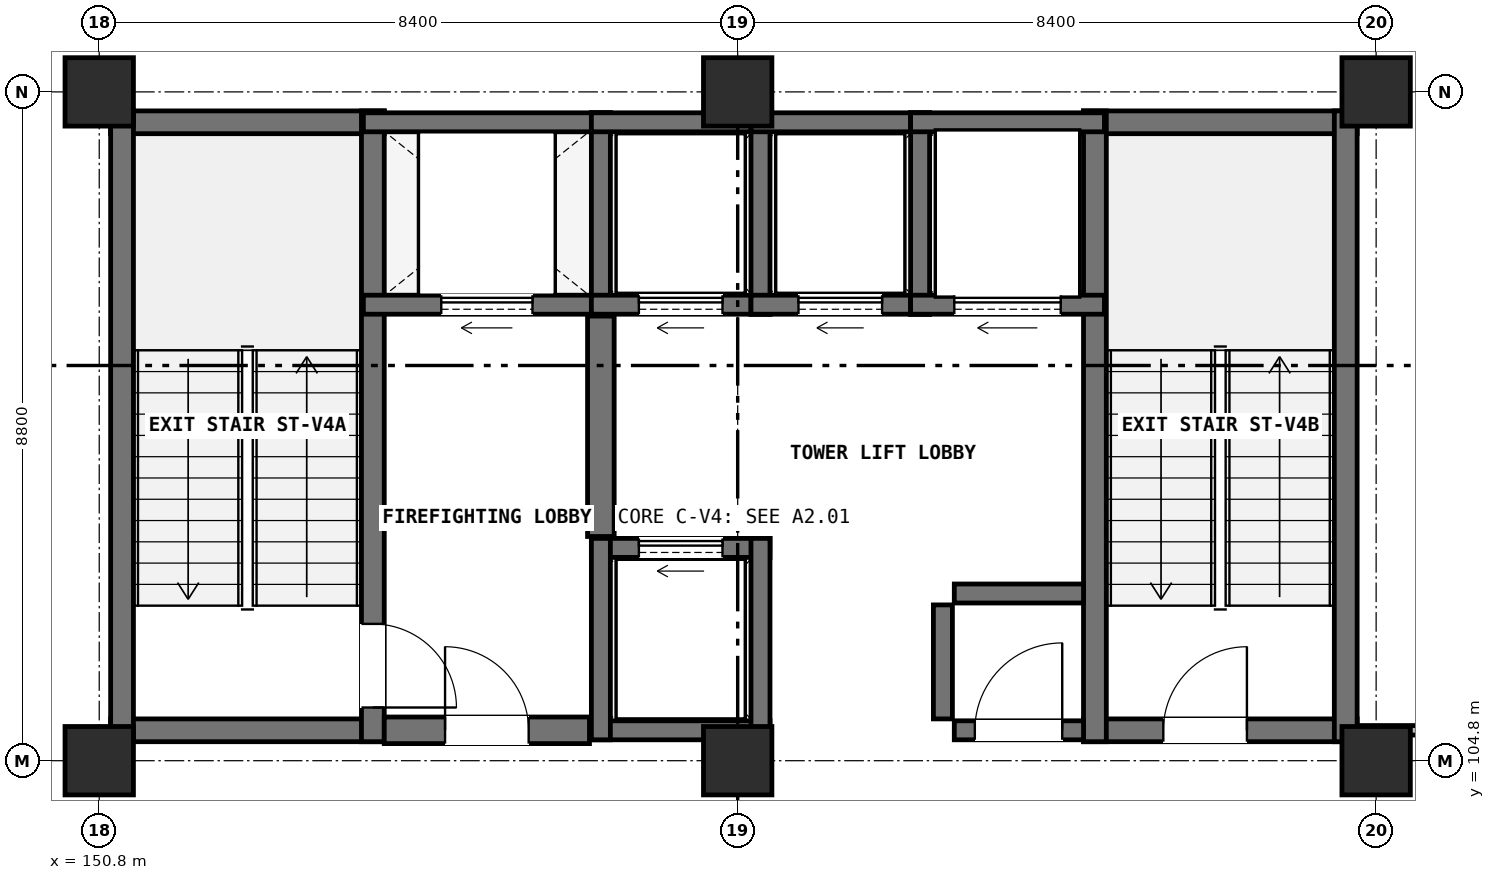
"""IFC4 building model, lengths in metres.
Left out: names, types, materials, properties, quantities, classifications, styles, units other than length and angle.
Written with IfcOpenShell. Run it as: python <this file> out.ifc"""

import sys

from ifc_helpers import new_model, si_unit, direction, frame, frame_2d, origin, origin_2d, place, context, subcontext, project, spatial, rectangle, extrude, element, fill, save


model = new_model("IFC4")
c1 = context("Model", 3, precision=1e-05, world=origin(), true_north=direction((0.0, 1.0)))
c2 = subcontext(c1, "Body", "Model", "MODEL_VIEW")
j1 = project(units=[si_unit("LENGTHUNIT", "METRE"), si_unit("PLANEANGLEUNIT", "RADIAN")], contexts=[c1])
p1 = place(None, origin())
s1 = spatial("IfcSite", under=j1, at=p1, CompositionType="ELEMENT")
p2 = place(p1, origin())
s2 = spatial("IfcBuilding", under=s1, at=p2, CompositionType="ELEMENT")
p3 = place(p2, frame((0.0, 0.0, -4.5)))
s3 = spatial("IfcBuildingStorey", under=s2, at=p3, CompositionType="ELEMENT", Elevation=-4.5)
for number, where, z_axis, x_axis in (
    (1, (150.8, 104.8, 0.0), (0.0, 0.0, 1.0), (1.0, 0.0, 0.0)),
    (2, (150.8, 113.6, 0.0), (0.0, 0.0, 1.0), (1.0, 0.0, 0.0)),
    (3, (159.2, 104.8, 0.0), (0.0, 0.0, 1.0), (1.0, 0.0, 0.0)),
    (4, (159.2, 113.6, 0.0), (0.0, 0.0, 1.0), (1.0, 0.0, 0.0)),
    (5, (167.6, 104.8, 0.0), (0.0, 0.0, 1.0), (1.0, 0.0, 0.0)),
    (6, (167.6, 113.6, 0.0), (0.0, 0.0, 1.0), (1.0, 0.0, 0.0)),
):
    element("IfcColumn", number, at=place(p3, frame(where, z_axis=z_axis, x_axis=x_axis)), inside=s3, PredefinedType="COLUMN", context=c2, shape_type="SweptSolid", body=[
        extrude(rectangle(XDim=0.9, YDim=0.9, at=origin_2d()), origin(), (0.0, 0.0, 1.0), 4.5),
    ])
for number, where, z_axis, x_axis in (
    (7, (150.95, 105.2, 0.0), (0.0, 0.0, 1.0), (1.0, 0.0, 0.0)),
    (8, (150.95, 113.2, 0.0), (0.0, 0.0, 1.0), (1.0, 0.0, 0.0)),
):
    element("IfcWall", number, at=place(p3, frame(where, z_axis=z_axis, x_axis=x_axis)), inside=s3, PredefinedType="SHEAR", context=c2, shape_type="SweptSolid", body=[
        extrude(rectangle(XDim=3.6, YDim=0.3, at=frame_2d((1.8, 0.0))), origin(), (0.0, 0.0, 1.0), 4.5),
    ])
p4 = place(p3, frame((151.1, 105.05, 0.0), z_axis=(0.0, 0.0, 1.0), x_axis=(0.0, 1.0, 0.0)))
e9 = element("IfcWall", 9, at=p4, inside=s3, PredefinedType="SHEAR", context=c2, shape_type="SweptSolid", body=[
    extrude(rectangle(XDim=8.3, YDim=0.3, at=frame_2d((4.15, 0.0))), origin(), (0.0, 0.0, 1.0), 4.5),
])
p5 = place(p3, frame((154.4, 105.05, 0.0), z_axis=(0.0, 0.0, 1.0), x_axis=(0.0, 1.0, 0.0)))
e10 = element("IfcWall", 10, at=p5, inside=s3, PredefinedType="SHEAR", context=c2, shape_type="SweptSolid", body=[
    extrude(rectangle(XDim=8.3, YDim=0.3, at=frame_2d((4.15, 0.0))), origin(), (0.0, 0.0, 1.0), 4.5),
])
p6 = place(p5, frame((0.45, 0.0, 0.0)))
e11 = element("IfcOpeningElement", 11, at=p6, cuts=e10, PredefinedType="OPENING", context=c2, shape_type="SweptSolid", body=[
    extrude(rectangle(XDim=1.1, YDim=2.2, at=frame_2d((0.55, 1.1))), frame((0.0, 0.16, 0.0), z_axis=(0.0, -1.0, 0.0), x_axis=(1.0, 0.0, 0.0)), (0.0, 0.0, 1.0), 0.32),
])
p7 = place(p3, frame((163.75, 105.2, 0.0), z_axis=(0.0, 0.0, 1.0), x_axis=(1.0, 0.0, 0.0)))
e12 = element("IfcWall", 12, at=p7, inside=s3, PredefinedType="SHEAR", context=c2, shape_type="SweptSolid", body=[
    extrude(rectangle(XDim=3.6, YDim=0.3, at=frame_2d((1.8, 0.0))), origin(), (0.0, 0.0, 1.0), 4.5),
])
p8 = place(p7, frame((1.05, 0.0, 0.0)))
e13 = element("IfcOpeningElement", 13, at=p8, cuts=e12, PredefinedType="OPENING", context=c2, shape_type="SweptSolid", body=[
    extrude(rectangle(XDim=1.1, YDim=2.2, at=frame_2d((0.55, 1.1))), frame((0.0, 0.16, 0.0), z_axis=(0.0, -1.0, 0.0), x_axis=(1.0, 0.0, 0.0)), (0.0, 0.0, 1.0), 0.32),
])
p9 = place(p3, frame((163.75, 113.2, 0.0), z_axis=(0.0, 0.0, 1.0), x_axis=(1.0, 0.0, 0.0)))
e14 = element("IfcWall", 14, at=p9, inside=s3, PredefinedType="SHEAR", context=c2, shape_type="SweptSolid", body=[
    extrude(rectangle(XDim=3.6, YDim=0.3, at=frame_2d((1.8, 0.0))), origin(), (0.0, 0.0, 1.0), 4.5),
])
for number, where, z_axis, x_axis in (
    (15, (163.9, 105.05, 0.0), (0.0, 0.0, 1.0), (0.0, 1.0, 0.0)),
    (16, (167.2, 105.05, 0.0), (0.0, 0.0, 1.0), (0.0, 1.0, 0.0)),
):
    element("IfcWall", number, at=place(p3, frame(where, z_axis=z_axis, x_axis=x_axis)), inside=s3, PredefinedType="SHEAR", context=c2, shape_type="SweptSolid", body=[
        extrude(rectangle(XDim=8.3, YDim=0.3, at=frame_2d((4.15, 0.0))), origin(), (0.0, 0.0, 1.0), 4.5),
    ])
p10 = place(p3, frame((154.275, 110.8, 0.0), z_axis=(0.0, 0.0, 1.0), x_axis=(1.0, 0.0, 0.0)))
e17 = element("IfcWall", 17, at=p10, inside=s3, PredefinedType="SOLIDWALL", context=c2, shape_type="SweptSolid", body=[
    extrude(rectangle(XDim=3.25, YDim=0.25, at=frame_2d((1.625, 0.0))), origin(), (0.0, 0.0, 1.0), 4.18),
])
p11 = place(p10, frame((1.025, 0.0, 0.0)))
e18 = element("IfcOpeningElement", 18, at=p11, cuts=e17, PredefinedType="OPENING", context=c2, shape_type="SweptSolid", body=[
    extrude(rectangle(XDim=1.2, YDim=2.2, at=frame_2d((0.6, 1.1))), frame((0.0, 0.135, 0.0), z_axis=(0.0, -1.0, 0.0), x_axis=(1.0, 0.0, 0.0)), (0.0, 0.0, 1.0), 0.27),
])
p12 = place(p3, frame((154.275, 113.2, 0.0), z_axis=(0.0, 0.0, 1.0), x_axis=(1.0, 0.0, 0.0)))
e19 = element("IfcWall", 19, at=p12, inside=s3, PredefinedType="SOLIDWALL", context=c2, shape_type="SweptSolid", body=[
    extrude(rectangle(XDim=3.25, YDim=0.25, at=frame_2d((1.625, 0.0))), origin(), (0.0, 0.0, 1.0), 4.18),
])
p13 = place(p3, frame((157.4, 110.675, 0.0), z_axis=(0.0, 0.0, 1.0), x_axis=(0.0, 1.0, 0.0)))
e20 = element("IfcWall", 20, at=p13, inside=s3, PredefinedType="SOLIDWALL", context=c2, shape_type="SweptSolid", body=[
    extrude(rectangle(XDim=2.65, YDim=0.25, at=frame_2d((1.325, 0.0))), origin(), (0.0, 0.0, 1.0), 4.18),
])
p14 = place(p3, frame((157.275, 110.8, 0.0), z_axis=(0.0, 0.0, 1.0), x_axis=(1.0, 0.0, 0.0)))
e21 = element("IfcWall", 21, at=p14, inside=s3, PredefinedType="SOLIDWALL", context=c2, shape_type="SweptSolid", body=[
    extrude(rectangle(XDim=2.35, YDim=0.25, at=frame_2d((1.175, 0.0))), origin(), (0.0, 0.0, 1.0), 4.18),
])
p15 = place(p14, frame((0.625, 0.0, 0.0)))
e22 = element("IfcOpeningElement", 22, at=p15, cuts=e21, PredefinedType="OPENING", context=c2, shape_type="SweptSolid", body=[
    extrude(rectangle(XDim=1.1, YDim=2.2, at=frame_2d((0.55, 1.1))), frame((0.0, 0.135, 0.0), z_axis=(0.0, -1.0, 0.0), x_axis=(1.0, 0.0, 0.0)), (0.0, 0.0, 1.0), 0.27),
])
p16 = place(p3, frame((157.275, 113.2, 0.0), z_axis=(0.0, 0.0, 1.0), x_axis=(1.0, 0.0, 0.0)))
e23 = element("IfcWall", 23, at=p16, inside=s3, PredefinedType="SOLIDWALL", context=c2, shape_type="SweptSolid", body=[
    extrude(rectangle(XDim=2.35, YDim=0.25, at=frame_2d((1.175, 0.0))), origin(), (0.0, 0.0, 1.0), 4.18),
])
p17 = place(p3, frame((159.5, 110.675, 0.0), z_axis=(0.0, 0.0, 1.0), x_axis=(0.0, 1.0, 0.0)))
e24 = element("IfcWall", 24, at=p17, inside=s3, PredefinedType="SOLIDWALL", context=c2, shape_type="SweptSolid", body=[
    extrude(rectangle(XDim=2.65, YDim=0.25, at=frame_2d((1.325, 0.0))), origin(), (0.0, 0.0, 1.0), 4.18),
])
p18 = place(p3, frame((159.375, 110.8, 0.0), z_axis=(0.0, 0.0, 1.0), x_axis=(1.0, 0.0, 0.0)))
e25 = element("IfcWall", 25, at=p18, inside=s3, PredefinedType="SOLIDWALL", context=c2, shape_type="SweptSolid", body=[
    extrude(rectangle(XDim=2.35, YDim=0.25, at=frame_2d((1.175, 0.0))), origin(), (0.0, 0.0, 1.0), 4.18),
])
p19 = place(p18, frame((0.625, 0.0, 0.0)))
e26 = element("IfcOpeningElement", 26, at=p19, cuts=e25, PredefinedType="OPENING", context=c2, shape_type="SweptSolid", body=[
    extrude(rectangle(XDim=1.1, YDim=2.2, at=frame_2d((0.55, 1.1))), frame((0.0, 0.135, 0.0), z_axis=(0.0, -1.0, 0.0), x_axis=(1.0, 0.0, 0.0)), (0.0, 0.0, 1.0), 0.27),
])
p20 = place(p3, frame((159.375, 113.2, 0.0), z_axis=(0.0, 0.0, 1.0), x_axis=(1.0, 0.0, 0.0)))
e27 = element("IfcWall", 27, at=p20, inside=s3, PredefinedType="SOLIDWALL", context=c2, shape_type="SweptSolid", body=[
    extrude(rectangle(XDim=2.35, YDim=0.25, at=frame_2d((1.175, 0.0))), origin(), (0.0, 0.0, 1.0), 4.18),
])
p21 = place(p3, frame((161.6, 110.675, 0.0), z_axis=(0.0, 0.0, 1.0), x_axis=(0.0, 1.0, 0.0)))
e28 = element("IfcWall", 28, at=p21, inside=s3, PredefinedType="SOLIDWALL", context=c2, shape_type="SweptSolid", body=[
    extrude(rectangle(XDim=2.65, YDim=0.25, at=frame_2d((1.325, 0.0))), origin(), (0.0, 0.0, 1.0), 4.18),
])
p22 = place(p3, frame((157.275, 105.2, 0.0), z_axis=(0.0, 0.0, 1.0), x_axis=(1.0, 0.0, 0.0)))
e29 = element("IfcWall", 29, at=p22, inside=s3, PredefinedType="SOLIDWALL", context=c2, shape_type="SweptSolid", body=[
    extrude(rectangle(XDim=2.35, YDim=0.25, at=frame_2d((1.175, 0.0))), origin(), (0.0, 0.0, 1.0), 4.18),
])
p23 = place(p3, frame((157.275, 107.6, 0.0), z_axis=(0.0, 0.0, 1.0), x_axis=(1.0, 0.0, 0.0)))
e30 = element("IfcWall", 30, at=p23, inside=s3, PredefinedType="SOLIDWALL", context=c2, shape_type="SweptSolid", body=[
    extrude(rectangle(XDim=2.35, YDim=0.25, at=frame_2d((1.175, 0.0))), origin(), (0.0, 0.0, 1.0), 4.18),
])
p24 = place(p23, frame((0.625, 0.0, 0.0)))
e31 = element("IfcOpeningElement", 31, at=p24, cuts=e30, PredefinedType="OPENING", context=c2, shape_type="SweptSolid", body=[
    extrude(rectangle(XDim=1.1, YDim=2.2, at=frame_2d((0.55, 1.1))), frame((0.0, 0.135, 0.0), z_axis=(0.0, -1.0, 0.0), x_axis=(1.0, 0.0, 0.0)), (0.0, 0.0, 1.0), 0.27),
])
for number, where, z_axis, x_axis in (
    (32, (157.4, 105.075, 0.0), (0.0, 0.0, 1.0), (0.0, 1.0, 0.0)),
    (33, (159.5, 105.075, 0.0), (0.0, 0.0, 1.0), (0.0, 1.0, 0.0)),
):
    element("IfcWall", number, at=place(p3, frame(where, z_axis=z_axis, x_axis=x_axis)), inside=s3, PredefinedType="SOLIDWALL", context=c2, shape_type="SweptSolid", body=[
        extrude(rectangle(XDim=2.65, YDim=0.25, at=frame_2d((1.325, 0.0))), origin(), (0.0, 0.0, 1.0), 4.18),
    ])
p25 = place(p3, frame((161.475, 110.8, 0.0), z_axis=(0.0, 0.0, 1.0), x_axis=(1.0, 0.0, 0.0)))
e34 = element("IfcWall", 34, at=p25, inside=s3, PredefinedType="SOLIDWALL", context=c2, shape_type="SweptSolid", body=[
    extrude(rectangle(XDim=2.55, YDim=0.25, at=frame_2d((1.275, 0.0))), origin(), (0.0, 0.0, 1.0), 4.18),
])
p26 = place(p25, frame((0.575, 0.0, 0.0)))
e35 = element("IfcOpeningElement", 35, at=p26, cuts=e34, PredefinedType="OPENING", context=c2, shape_type="SweptSolid", body=[
    extrude(rectangle(XDim=1.4, YDim=2.3, at=frame_2d((0.7, 1.15))), frame((0.0, 0.135, 0.0), z_axis=(0.0, -1.0, 0.0), x_axis=(1.0, 0.0, 0.0)), (0.0, 0.0, 1.0), 0.27),
])
p27 = place(p3, frame((161.475, 113.2, 0.0), z_axis=(0.0, 0.0, 1.0), x_axis=(1.0, 0.0, 0.0)))
e36 = element("IfcWall", 36, at=p27, inside=s3, PredefinedType="SOLIDWALL", context=c2, shape_type="SweptSolid", body=[
    extrude(rectangle(XDim=2.55, YDim=0.25, at=frame_2d((1.275, 0.0))), origin(), (0.0, 0.0, 1.0), 4.18),
])
p28 = place(p3, frame((157.4, 107.75, 0.0), z_axis=(0.0, 0.0, 1.0), x_axis=(0.0, 1.0, 0.0)))
e37 = element("IfcWall", 37, at=p28, inside=s3, PredefinedType="SHEAR", context=c2, shape_type="SweptSolid", body=[
    extrude(rectangle(XDim=2.9, YDim=0.35, at=frame_2d((1.45, 0.0))), origin(), (0.0, 0.0, 1.0), 4.18),
])
p29 = place(p3, frame((154.55, 105.2, 0.0), z_axis=(0.0, 0.0, 1.0), x_axis=(1.0, 0.0, 0.0)))
e38 = element("IfcWall", 38, at=p29, inside=s3, PredefinedType="SHEAR", context=c2, shape_type="SweptSolid", body=[
    extrude(rectangle(XDim=2.7, YDim=0.35, at=frame_2d((1.35, 0.0))), origin(), (0.0, 0.0, 1.0), 4.18),
])
p30 = place(p29, frame((0.8, 0.0, 0.0)))
e39 = element("IfcOpeningElement", 39, at=p30, cuts=e38, PredefinedType="OPENING", context=c2, shape_type="SweptSolid", body=[
    extrude(rectangle(XDim=1.1, YDim=2.2, at=frame_2d((0.55, 1.1))), frame((0.0, 0.185, 0.0), z_axis=(0.0, -1.0, 0.0), x_axis=(1.0, 0.0, 0.0)), (0.0, 0.0, 1.0), 0.37),
])
p31 = place(p3, frame((161.9, 105.35, 0.0), z_axis=(0.0, 0.0, 1.0), x_axis=(0.0, 1.0, 0.0)))
e40 = element("IfcWall", 40, at=p31, inside=s3, PredefinedType="SOLIDWALL", context=c2, shape_type="SweptSolid", body=[
    extrude(rectangle(XDim=1.5, YDim=0.25, at=frame_2d((0.75, 0.0))), origin(), (0.0, 0.0, 1.0), 4.18),
])
p32 = place(p3, frame((162.05, 107.0, 0.0), z_axis=(0.0, 0.0, 1.0), x_axis=(1.0, 0.0, 0.0)))
e41 = element("IfcWall", 41, at=p32, inside=s3, PredefinedType="SOLIDWALL", context=c2, shape_type="SweptSolid", body=[
    extrude(rectangle(XDim=1.7, YDim=0.25, at=frame_2d((0.85, 0.0))), origin(), (0.0, 0.0, 1.0), 4.18),
])
p33 = place(p3, frame((162.05, 105.2, 0.0), z_axis=(0.0, 0.0, 1.0), x_axis=(1.0, 0.0, 0.0)))
e42 = element("IfcWall", 42, at=p33, inside=s3, PredefinedType="SOLIDWALL", context=c2, shape_type="SweptSolid", body=[
    extrude(rectangle(XDim=1.7, YDim=0.25, at=frame_2d((0.85, 0.0))), origin(), (0.0, 0.0, 1.0), 4.18),
])
p34 = place(p33, frame((0.27, 0.0, 0.0)))
e43 = element("IfcOpeningElement", 43, at=p34, cuts=e42, PredefinedType="OPENING", context=c2, shape_type="SweptSolid", body=[
    extrude(rectangle(XDim=1.15, YDim=2.2, at=frame_2d((0.575, 1.1))), frame((0.0, 0.135, 0.0), z_axis=(0.0, -1.0, 0.0), x_axis=(1.0, 0.0, 0.0)), (0.0, 0.0, 1.0), 0.27),
])
p35 = place(p3, frame((167.355, 105.2, 0.0), z_axis=(0.0, 0.0, 1.0), x_axis=(1.0, 0.0, 0.0)))
e44 = element("IfcWall", 44, at=p35, inside=s3, PredefinedType="PARTITIONING", context=c2, shape_type="SweptSolid", body=[
    extrude(rectangle(XDim=4.245, YDim=0.125, at=frame_2d((2.123, 0.0))), origin(), (0.0, 0.0, 1.0), 3.745),
])
p36 = place(p35, frame((1.633, 0.0, 0.0)))
e45 = element("IfcOpeningElement", 45, at=p36, cuts=e44, PredefinedType="OPENING", context=c2, shape_type="SweptSolid", body=[
    extrude(rectangle(XDim=0.98, YDim=2.1, at=frame_2d((0.49, 1.05))), frame((0.0, 0.073, 0.0), z_axis=(0.0, -1.0, 0.0), x_axis=(1.0, 0.0, 0.0)), (0.0, 0.0, 1.0), 0.145),
])
p37 = place(p6, frame((1.1, 0.0, 0.0), z_axis=(0.0, 0.0, 1.0), x_axis=(-1.0, 0.0, 0.0)))
e46 = element("IfcDoor", 46, at=p37, inside=s3, OperationType="SINGLE_SWING_LEFT", PredefinedType="DOOR", context=c2, shape_type="SweptSolid", body=[
    extrude(rectangle(XDim=1.1, YDim=2.2, at=frame_2d((0.55, 1.1))), frame((0.0, 0.025, 0.0), z_axis=(0.0, -1.0, 0.0), x_axis=(1.0, 0.0, 0.0)), (0.0, 0.0, 1.0), 0.05),
])
fill(e11, e46)
p38 = place(p8, origin())
e47 = element("IfcDoor", 47, at=p38, inside=s3, OperationType="SINGLE_SWING_RIGHT", PredefinedType="DOOR", context=c2, shape_type="SweptSolid", body=[
    extrude(rectangle(XDim=1.1, YDim=2.2, at=frame_2d((0.55, 1.1))), frame((0.0, 0.025, 0.0), z_axis=(0.0, -1.0, 0.0), x_axis=(1.0, 0.0, 0.0)), (0.0, 0.0, 1.0), 0.05),
])
fill(e13, e47)
p39 = place(p11, origin())
e48 = element("IfcDoor", 48, at=p39, inside=s3, OperationType="SLIDING_TO_LEFT", PredefinedType="DOOR", context=c2, shape_type="SweptSolid", body=[
    extrude(rectangle(XDim=1.2, YDim=2.2, at=frame_2d((0.6, 1.1))), frame((0.0, 0.025, 0.0), z_axis=(0.0, -1.0, 0.0), x_axis=(1.0, 0.0, 0.0)), (0.0, 0.0, 1.0), 0.05),
])
fill(e18, e48)
p40 = place(p15, origin())
e49 = element("IfcDoor", 49, at=p40, inside=s3, OperationType="SLIDING_TO_LEFT", PredefinedType="DOOR", context=c2, shape_type="SweptSolid", body=[
    extrude(rectangle(XDim=1.1, YDim=2.2, at=frame_2d((0.55, 1.1))), frame((0.0, 0.025, 0.0), z_axis=(0.0, -1.0, 0.0), x_axis=(1.0, 0.0, 0.0)), (0.0, 0.0, 1.0), 0.05),
])
fill(e22, e49)
p41 = place(p19, origin())
e50 = element("IfcDoor", 50, at=p41, inside=s3, OperationType="SLIDING_TO_LEFT", PredefinedType="DOOR", context=c2, shape_type="SweptSolid", body=[
    extrude(rectangle(XDim=1.1, YDim=2.2, at=frame_2d((0.55, 1.1))), frame((0.0, 0.025, 0.0), z_axis=(0.0, -1.0, 0.0), x_axis=(1.0, 0.0, 0.0)), (0.0, 0.0, 1.0), 0.05),
])
fill(e26, e50)
p42 = place(p24, origin())
e51 = element("IfcDoor", 51, at=p42, inside=s3, OperationType="SLIDING_TO_LEFT", PredefinedType="DOOR", context=c2, shape_type="SweptSolid", body=[
    extrude(rectangle(XDim=1.1, YDim=2.2, at=frame_2d((0.55, 1.1))), frame((0.0, 0.025, 0.0), z_axis=(0.0, -1.0, 0.0), x_axis=(1.0, 0.0, 0.0)), (0.0, 0.0, 1.0), 0.05),
])
fill(e31, e51)
p43 = place(p26, origin())
e52 = element("IfcDoor", 52, at=p43, inside=s3, OperationType="SLIDING_TO_LEFT", PredefinedType="DOOR", context=c2, shape_type="SweptSolid", body=[
    extrude(rectangle(XDim=1.4, YDim=2.3, at=frame_2d((0.7, 1.15))), frame((0.0, 0.025, 0.0), z_axis=(0.0, -1.0, 0.0), x_axis=(1.0, 0.0, 0.0)), (0.0, 0.0, 1.0), 0.05),
])
fill(e35, e52)
p44 = place(p30, origin())
e53 = element("IfcDoor", 53, at=p44, inside=s3, OperationType="SINGLE_SWING_LEFT", PredefinedType="DOOR", context=c2, shape_type="SweptSolid", body=[
    extrude(rectangle(XDim=1.1, YDim=2.2, at=frame_2d((0.55, 1.1))), frame((0.0, 0.025, 0.0), z_axis=(0.0, -1.0, 0.0), x_axis=(1.0, 0.0, 0.0)), (0.0, 0.0, 1.0), 0.05),
])
fill(e39, e53)
p45 = place(p34, origin())
e54 = element("IfcDoor", 54, at=p45, inside=s3, OperationType="SINGLE_SWING_RIGHT", PredefinedType="DOOR", context=c2, shape_type="SweptSolid", body=[
    extrude(rectangle(XDim=1.15, YDim=2.2, at=frame_2d((0.575, 1.1))), frame((0.0, 0.025, 0.0), z_axis=(0.0, -1.0, 0.0), x_axis=(1.0, 0.0, 0.0)), (0.0, 0.0, 1.0), 0.05),
])
fill(e43, e54)
save(model, sys.argv[1])
